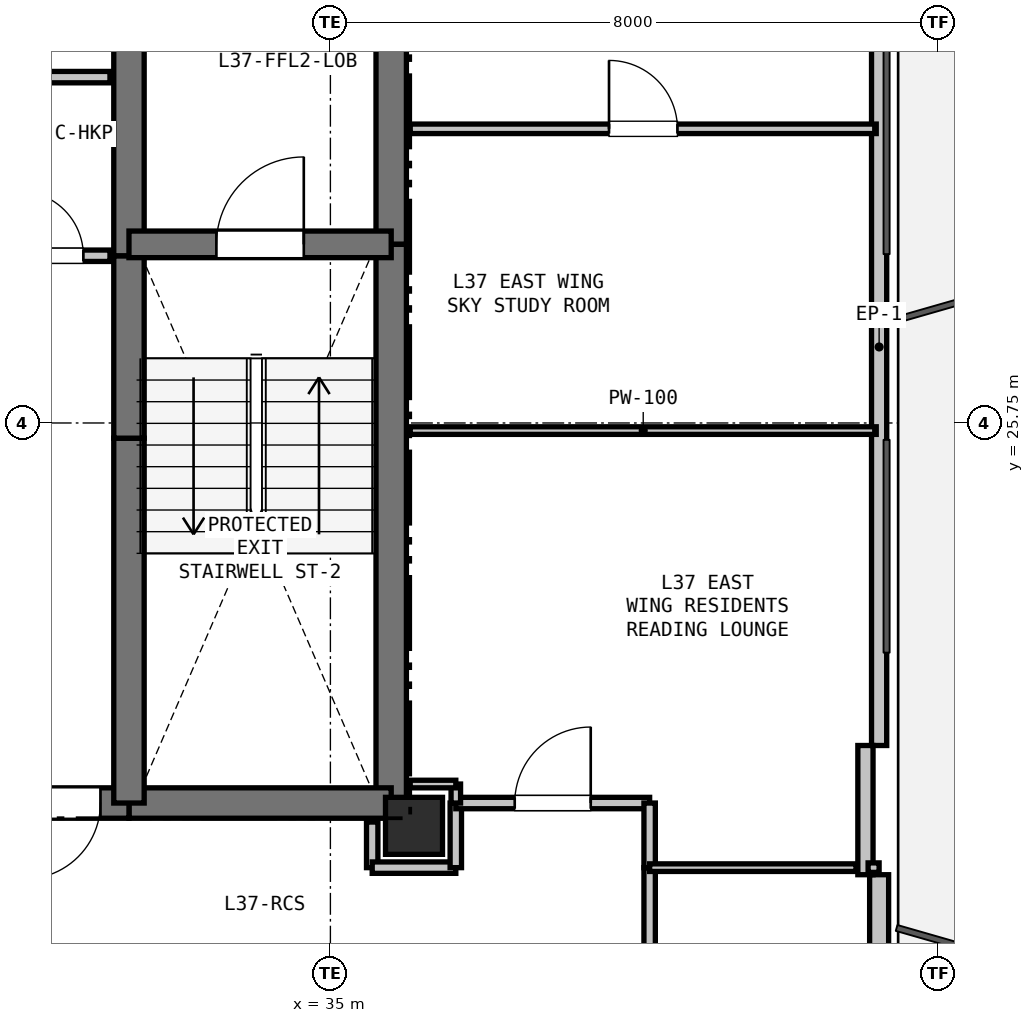
"""IFC4 building model, lengths in metres.
Left out: names, types, materials, properties, quantities, classifications, styles, units other than length and angle.
Written with IfcOpenShell. Run it as: python <this file> out.ifc"""

import sys

from ifc_helpers import new_model, si_unit, direction, frame, frame_2d, origin, origin_2d, place, context, subcontext, project, spatial, rectangle, extrude, element, fill, save


model = new_model("IFC4")
c1 = context("Model", 3, precision=1e-05, world=origin(), true_north=direction((0.0, 1.0)))
c2 = subcontext(c1, "Body", "Model", "MODEL_VIEW")
j1 = project(units=[si_unit("LENGTHUNIT", "METRE"), si_unit("PLANEANGLEUNIT", "RADIAN")], contexts=[c1])
p1 = place(None, origin())
s1 = spatial("IfcSite", under=j1, at=p1, CompositionType="ELEMENT")
p2 = place(p1, origin())
s2 = spatial("IfcBuilding", under=s1, at=p2, CompositionType="ELEMENT")
p3 = place(p2, frame((0.0, 0.0, 134.4)))
s3 = spatial("IfcBuildingStorey", under=s2, at=p3, CompositionType="ELEMENT", Elevation=134.4)
p4 = place(p3, frame((36.1, 20.45, 0.0), z_axis=(0.0, 0.0, 1.0), x_axis=(1.0, 0.0, 0.0)))
e1 = element("IfcColumn", 1, at=p4, inside=s3, PredefinedType="COLUMN", context=c2, shape_type="SweptSolid", body=[
    extrude(rectangle(XDim=0.75, YDim=0.75, at=origin_2d()), origin(), (0.0, 0.0, 1.0), 3.3),
])
p5 = place(p3, frame((42.219, 31.993, 0.0), z_axis=(0.0, 0.0, 1.0), x_axis=(0.0, -1.0, 0.0)))
e2 = element("IfcWall", 2, at=p5, inside=s3, PredefinedType="PARAPET", context=c2, shape_type="SweptSolid", body=[
    extrude(rectangle(XDim=10.486, YDim=0.2, at=frame_2d((5.243, 0.0))), origin(), (0.0, 0.0, 1.0), 0.2),
])
p6 = place(p3, frame((42.219, 19.807, 0.0), z_axis=(0.0, 0.0, 1.0), x_axis=(0.0, -1.0, 0.0)))
e3 = element("IfcWall", 3, at=p6, inside=s3, PredefinedType="SOLIDWALL", context=c2, shape_type="SweptSolid", body=[
    extrude(rectangle(XDim=11.186, YDim=0.25, at=frame_2d((5.593, 0.0))), origin(), (0.0, 0.0, 1.0), 2.68),
])
p7 = place(p6, frame((9.327, 0.0, 0.9)))
e4 = element("IfcOpeningElement", 4, at=p7, cuts=e3, PredefinedType="OPENING", context=c2, shape_type="SweptSolid", body=[
    extrude(rectangle(XDim=1.2, YDim=1.4, at=frame_2d((0.6, 0.7))), frame((0.0, 0.135, 0.0), z_axis=(0.0, -1.0, 0.0), x_axis=(1.0, 0.0, 0.0)), (0.0, 0.0, 1.0), 0.27),
])
p8 = place(p3, frame((42.039, 21.507, 0.0), z_axis=(0.0, 0.0, 1.0), x_axis=(0.0, -1.0, 0.0)))
e5 = element("IfcWall", 5, at=p8, inside=s3, PredefinedType="PARAPET", context=c2, shape_type="SweptSolid", body=[
    extrude(rectangle(XDim=1.7, YDim=0.2, at=frame_2d((0.85, 0.0))), origin(), (0.0, 0.0, 1.0), 2.68),
])
p9 = place(p3, frame((35.8, 32.75, 0.0), z_axis=(0.0, 0.0, 1.0), x_axis=(0.0, -1.0, 0.0)))
e6 = element("IfcWall", 6, at=p9, inside=s3, PredefinedType="SHEAR", context=c2, shape_type="SweptSolid", body=[
    extrude(rectangle(XDim=4.65, YDim=0.4, at=frame_2d((2.325, 0.0))), origin(), (0.0, 0.0, 1.0), 3.06),
])
p10 = place(p3, frame((35.8, 28.1, 0.0), z_axis=(0.0, 0.0, 1.0), x_axis=(0.0, -1.0, 0.0)))
e7 = element("IfcWall", 7, at=p10, inside=s3, PredefinedType="SHEAR", context=c2, shape_type="SweptSolid", body=[
    extrude(rectangle(XDim=7.35, YDim=0.4, at=frame_2d((3.675, 0.0))), origin(), (0.0, 0.0, 1.0), 3.06),
])
p11 = place(p3, frame((35.8, 20.75, 0.0), z_axis=(0.0, 0.0, 1.0), x_axis=(-1.0, 0.0, 0.0)))
e8 = element("IfcWall", 8, at=p11, inside=s3, PredefinedType="SHEAR", context=c2, shape_type="SweptSolid", body=[
    extrude(rectangle(XDim=3.45, YDim=0.4, at=frame_2d((1.725, 0.0))), origin(), (0.0, 0.0, 1.0), 3.06),
])
p12 = place(p3, frame((32.35, 20.75, 0.0), z_axis=(0.0, 0.0, 1.0), x_axis=(-1.0, 0.0, 0.0)))
e9 = element("IfcWall", 9, at=p12, inside=s3, PredefinedType="SHEAR", context=c2, shape_type="SweptSolid", body=[
    extrude(rectangle(XDim=1.75, YDim=0.4, at=frame_2d((0.875, 0.0))), origin(), (0.0, 0.0, 1.0), 3.06),
])
p13 = place(p12, frame((0.375, 0.0, 0.0)))
e10 = element("IfcOpeningElement", 10, at=p13, cuts=e9, PredefinedType="OPENING", context=c2, shape_type="SweptSolid", body=[
    extrude(rectangle(XDim=1.0, YDim=2.15, at=frame_2d((0.5, 1.075))), frame((0.0, 0.21, 0.0), z_axis=(0.0, -1.0, 0.0), x_axis=(1.0, 0.0, 0.0)), (0.0, 0.0, 1.0), 0.42),
])
p14 = place(p3, frame((32.35, 20.75, 0.0), z_axis=(0.0, 0.0, 1.0), x_axis=(0.0, 1.0, 0.0)))
e11 = element("IfcWall", 11, at=p14, inside=s3, PredefinedType="SHEAR", context=c2, shape_type="SweptSolid", body=[
    extrude(rectangle(XDim=4.8, YDim=0.4, at=frame_2d((2.4, 0.0))), origin(), (0.0, 0.0, 1.0), 3.06),
])
p15 = place(p3, frame((32.35, 25.55, 0.0), z_axis=(0.0, 0.0, 1.0), x_axis=(0.0, 1.0, 0.0)))
e12 = element("IfcWall", 12, at=p15, inside=s3, PredefinedType="SHEAR", context=c2, shape_type="SweptSolid", body=[
    extrude(rectangle(XDim=2.4, YDim=0.4, at=frame_2d((1.2, 0.0))), origin(), (0.0, 0.0, 1.0), 3.06),
])
p16 = place(p3, frame((32.35, 27.95, 0.0), z_axis=(0.0, 0.0, 1.0), x_axis=(0.0, 1.0, 0.0)))
e13 = element("IfcWall", 13, at=p16, inside=s3, PredefinedType="SHEAR", context=c2, shape_type="SweptSolid", body=[
    extrude(rectangle(XDim=2.8, YDim=0.4, at=frame_2d((1.4, 0.0))), origin(), (0.0, 0.0, 1.0), 3.06),
])
p17 = place(p3, frame((32.35, 28.1, 0.0), z_axis=(0.0, 0.0, 1.0), x_axis=(1.0, 0.0, 0.0)))
e14 = element("IfcWall", 14, at=p17, inside=s3, PredefinedType="SHEAR", context=c2, shape_type="SweptSolid", body=[
    extrude(rectangle(XDim=3.45, YDim=0.35, at=frame_2d((1.725, 0.0))), origin(), (0.0, 0.0, 1.0), 3.06),
])
p18 = place(p17, frame((1.15, 0.0, 0.0)))
e15 = element("IfcOpeningElement", 15, at=p18, cuts=e14, PredefinedType="OPENING", context=c2, shape_type="SweptSolid", body=[
    extrude(rectangle(XDim=1.15, YDim=2.15, at=frame_2d((0.575, 1.075))), frame((0.0, 0.185, 0.0), z_axis=(0.0, -1.0, 0.0), x_axis=(1.0, 0.0, 0.0)), (0.0, 0.0, 1.0), 0.37),
])
p19 = place(p3, frame((32.1, 30.3, 0.0), z_axis=(0.0, 0.0, 1.0), x_axis=(-1.0, 0.0, 0.0)))
e16 = element("IfcWall", 16, at=p19, inside=s3, PredefinedType="PARTITIONING", context=c2, shape_type="SweptSolid", body=[
    extrude(rectangle(XDim=1.55, YDim=0.15, at=frame_2d((0.775, 0.0))), origin(), (0.0, 0.0, 1.0), 3.06),
])
p20 = place(p3, frame((30.55, 27.95, 0.0), z_axis=(0.0, 0.0, 1.0), x_axis=(1.0, 0.0, 0.0)))
e17 = element("IfcWall", 17, at=p20, inside=s3, PredefinedType="PARTITIONING", context=c2, shape_type="SweptSolid", body=[
    extrude(rectangle(XDim=1.55, YDim=0.15, at=frame_2d((0.775, 0.0))), origin(), (0.0, 0.0, 1.0), 3.06),
])
p21 = place(p20, frame((0.35, 0.0, 0.0)))
e18 = element("IfcOpeningElement", 18, at=p21, cuts=e17, PredefinedType="OPENING", context=c2, shape_type="SweptSolid", body=[
    extrude(rectangle(XDim=0.85, YDim=2.1, at=frame_2d((0.425, 1.05))), frame((0.0, 0.085, 0.0), z_axis=(0.0, -1.0, 0.0), x_axis=(1.0, 0.0, 0.0)), (0.0, 0.0, 1.0), 0.17),
])
p22 = place(p3, frame((35.55, 20.5, 0.0), z_axis=(0.0, 0.0, 1.0), x_axis=(0.0, -1.0, 0.0)))
e19 = element("IfcWall", 19, at=p22, inside=s3, PredefinedType="PARTITIONING", context=c2, shape_type="SweptSolid", body=[
    extrude(rectangle(XDim=0.6, YDim=0.15, at=frame_2d((0.3, 0.0))), origin(), (0.0, 0.0, 1.0), 2.508),
])
p23 = place(p3, frame((35.55, 19.9, 0.0), z_axis=(0.0, 0.0, 1.0), x_axis=(1.0, 0.0, 0.0)))
e20 = element("IfcWall", 20, at=p23, inside=s3, PredefinedType="PARTITIONING", context=c2, shape_type="SweptSolid", body=[
    extrude(rectangle(XDim=1.1, YDim=0.15, at=frame_2d((0.55, 0.0))), origin(), (0.0, 0.0, 1.0), 2.433),
])
p24 = place(p3, frame((36.65, 19.9, 0.0), z_axis=(0.0, 0.0, 1.0), x_axis=(0.0, 1.0, 0.0)))
e21 = element("IfcWall", 21, at=p24, inside=s3, PredefinedType="PARTITIONING", context=c2, shape_type="SweptSolid", body=[
    extrude(rectangle(XDim=0.85, YDim=0.15, at=frame_2d((0.425, 0.0))), origin(), (0.0, 0.0, 1.0), 3.06),
])
p25 = place(p3, frame((36.65, 20.75, 0.0), z_axis=(0.0, 0.0, 1.0), x_axis=(1.0, 0.0, 0.0)))
e22 = element("IfcWall", 22, at=p25, inside=s3, PredefinedType="PARTITIONING", context=c2, shape_type="SweptSolid", body=[
    extrude(rectangle(XDim=2.55, YDim=0.15, at=frame_2d((1.275, 0.0))), origin(), (0.0, 0.0, 1.0), 3.06),
])
p26 = place(p25, frame((0.775, 0.0, 0.0)))
e23 = element("IfcOpeningElement", 23, at=p26, cuts=e22, PredefinedType="OPENING", context=c2, shape_type="SweptSolid", body=[
    extrude(rectangle(XDim=1.0, YDim=2.15, at=frame_2d((0.5, 1.075))), frame((0.0, 0.085, 0.0), z_axis=(0.0, -1.0, 0.0), x_axis=(1.0, 0.0, 0.0)), (0.0, 0.0, 1.0), 0.17),
])
p27 = place(p3, frame((39.2, 20.75, 0.0), z_axis=(0.0, 0.0, 1.0), x_axis=(0.0, -1.0, 0.0)))
e24 = element("IfcWall", 24, at=p27, inside=s3, PredefinedType="PARTITIONING", context=c2, shape_type="SweptSolid", body=[
    extrude(rectangle(XDim=0.85, YDim=0.15, at=frame_2d((0.425, 0.0))), origin(), (0.0, 0.0, 1.0), 3.06),
])
p28 = place(p3, frame((39.2, 19.9, 0.0), z_axis=(0.0, 0.0, 1.0), x_axis=(0.0, -1.0, 0.0)))
e25 = element("IfcWall", 25, at=p28, inside=s3, PredefinedType="PARTITIONING", context=c2, shape_type="SweptSolid", body=[
    extrude(rectangle(XDim=1.75, YDim=0.15, at=frame_2d((0.875, 0.0))), origin(), (0.0, 0.0, 1.0), 3.06),
])
p29 = place(p3, frame((36.05, 29.62, 0.0), z_axis=(0.0, 0.0, 1.0), x_axis=(1.0, 0.0, 0.0)))
e26 = element("IfcWall", 26, at=p29, inside=s3, PredefinedType="PARTITIONING", context=c2, shape_type="SweptSolid", body=[
    extrude(rectangle(XDim=6.131, YDim=0.125, at=frame_2d((3.065, 0.0))), origin(), (0.0, 0.0, 1.0), 2.365),
])
p30 = place(p29, frame((2.615, 0.0, 0.0)))
e27 = element("IfcOpeningElement", 27, at=p30, cuts=e26, PredefinedType="OPENING", context=c2, shape_type="SweptSolid", body=[
    extrude(rectangle(XDim=0.9, YDim=2.1, at=frame_2d((0.45, 1.05))), frame((0.0, 0.073, 0.0), z_axis=(0.0, -1.0, 0.0), x_axis=(1.0, 0.0, 0.0)), (0.0, 0.0, 1.0), 0.145),
])
p31 = place(p3, frame((42.181, 25.65, 0.0), z_axis=(0.0, 0.0, 1.0), x_axis=(-1.0, 0.0, 0.0)))
e28 = element("IfcWall", 28, at=p31, inside=s3, PredefinedType="PARTITIONING", context=c2, shape_type="SweptSolid", body=[
    extrude(rectangle(XDim=6.131, YDim=0.1, at=frame_2d((3.065, 0.0))), origin(), (0.0, 0.0, 1.0), 2.365),
])
p32 = place(p3, frame((36.65, 20.75, 0.0), z_axis=(0.0, 0.0, 1.0), x_axis=(0.0, 1.0, 0.0)))
e29 = element("IfcWall", 29, at=p32, inside=s3, PredefinedType="PARTITIONING", context=c2, shape_type="SweptSolid", body=[
    extrude(rectangle(XDim=0.25, YDim=0.125, at=frame_2d((0.125, 0.0))), origin(), (0.0, 0.0, 1.0), 3.06),
])
p33 = place(p3, frame((36.65, 21.0, 0.0), z_axis=(0.0, 0.0, 1.0), x_axis=(-1.0, 0.0, 0.0)))
e30 = element("IfcWall", 30, at=p33, inside=s3, PredefinedType="PARTITIONING", context=c2, shape_type="SweptSolid", body=[
    extrude(rectangle(XDim=0.6, YDim=0.1, at=frame_2d((0.3, 0.0))), origin(), (0.0, 0.0, 1.0), 2.508),
])
p34 = place(p3, frame((42.219, 19.9, 0.0), z_axis=(0.0, 0.0, 1.0), x_axis=(-1.0, 0.0, 0.0)))
e31 = element("IfcWall", 31, at=p34, inside=s3, PredefinedType="PARTITIONING", context=c2, shape_type="SweptSolid", body=[
    extrude(rectangle(XDim=0.145, YDim=0.125, at=frame_2d((0.072, 0.0))), origin(), (0.0, 0.0, 1.0), 3.06),
])
p35 = place(p3, frame((41.915, 19.9, 0.0), z_axis=(0.0, 0.0, 1.0), x_axis=(-1.0, 0.0, 0.0)))
e32 = element("IfcWall", 32, at=p35, inside=s3, PredefinedType="PARTITIONING", context=c2, shape_type="SweptSolid", body=[
    extrude(rectangle(XDim=2.715, YDim=0.1, at=frame_2d((1.358, 0.0))), origin(), (0.0, 0.0, 1.0), 2.365),
])
p36 = place(p13, origin())
e33 = element("IfcDoor", 33, at=p36, inside=s3, OperationType="SINGLE_SWING_RIGHT", PredefinedType="DOOR", context=c2, shape_type="SweptSolid", body=[
    extrude(rectangle(XDim=1.0, YDim=2.15, at=frame_2d((0.5, 1.075))), frame((0.0, 0.025, 0.0), z_axis=(0.0, -1.0, 0.0), x_axis=(1.0, 0.0, 0.0)), (0.0, 0.0, 1.0), 0.05),
])
fill(e10, e33)
p37 = place(p18, origin())
e34 = element("IfcDoor", 34, at=p37, inside=s3, OperationType="SINGLE_SWING_RIGHT", PredefinedType="DOOR", context=c2, shape_type="SweptSolid", body=[
    extrude(rectangle(XDim=1.15, YDim=2.15, at=frame_2d((0.575, 1.075))), frame((0.0, 0.025, 0.0), z_axis=(0.0, -1.0, 0.0), x_axis=(1.0, 0.0, 0.0)), (0.0, 0.0, 1.0), 0.05),
])
fill(e15, e34)
p38 = place(p21, origin())
e35 = element("IfcDoor", 35, at=p38, inside=s3, OperationType="SINGLE_SWING_LEFT", PredefinedType="DOOR", context=c2, shape_type="SweptSolid", body=[
    extrude(rectangle(XDim=0.85, YDim=2.1, at=frame_2d((0.425, 1.05))), frame((0.0, 0.025, 0.0), z_axis=(0.0, -1.0, 0.0), x_axis=(1.0, 0.0, 0.0)), (0.0, 0.0, 1.0), 0.05),
])
fill(e18, e35)
p39 = place(p26, origin())
e36 = element("IfcDoor", 36, at=p39, inside=s3, OperationType="SINGLE_SWING_RIGHT", PredefinedType="DOOR", context=c2, shape_type="SweptSolid", body=[
    extrude(rectangle(XDim=1.0, YDim=2.15, at=frame_2d((0.5, 1.075))), frame((0.0, 0.025, 0.0), z_axis=(0.0, -1.0, 0.0), x_axis=(1.0, 0.0, 0.0)), (0.0, 0.0, 1.0), 0.05),
])
fill(e23, e36)
p40 = place(p30, origin())
e37 = element("IfcDoor", 37, at=p40, inside=s3, OperationType="SINGLE_SWING_LEFT", PredefinedType="DOOR", context=c2, shape_type="SweptSolid", body=[
    extrude(rectangle(XDim=0.9, YDim=2.1, at=frame_2d((0.45, 1.05))), frame((0.0, 0.025, 0.0), z_axis=(0.0, -1.0, 0.0), x_axis=(1.0, 0.0, 0.0)), (0.0, 0.0, 1.0), 0.05),
])
fill(e27, e37)
save(model, sys.argv[1])
